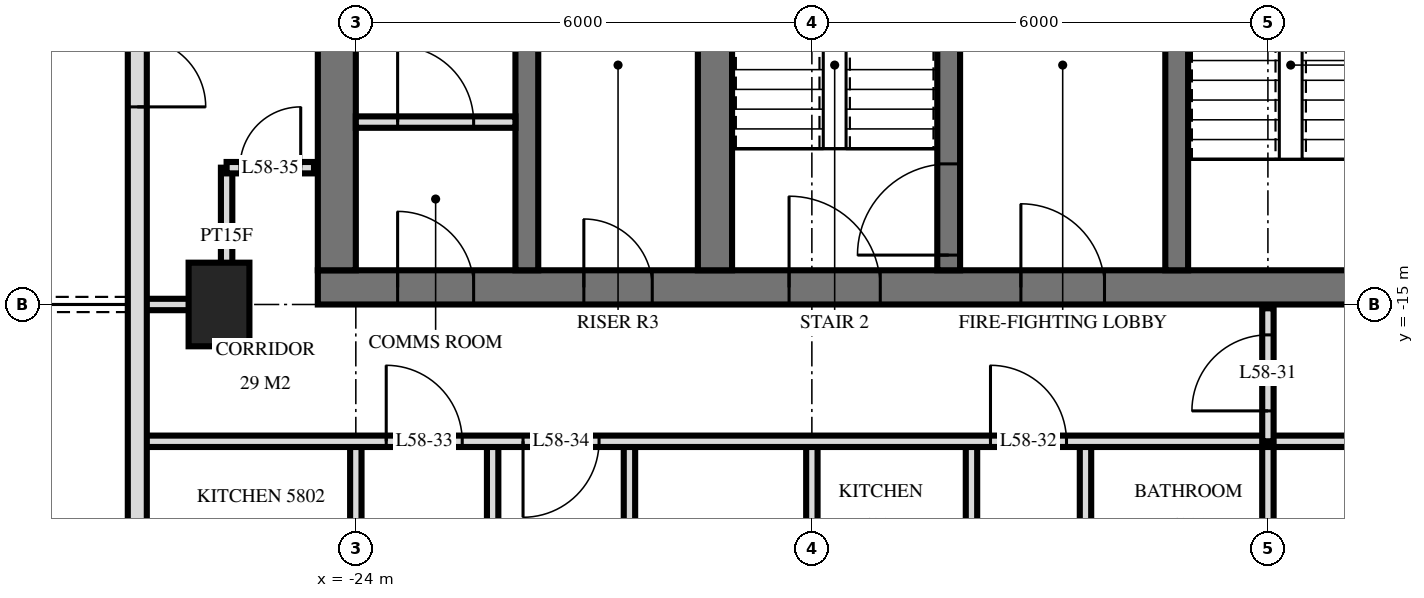
"""IFC4 building model, lengths in metres.
Left out: names, types, materials, properties, quantities, classifications, styles, units other than length and angle.
Written with IfcOpenShell. Run it as: python <this file> out.ifc"""

import sys

from ifc_helpers import new_model, si_unit, direction, frame, frame_2d, origin, origin_2d, place, context, subcontext, project, spatial, rectangle, extrude, element, fill, save


model = new_model("IFC4")
c1 = context("Model", 3, precision=1e-05, world=origin(), true_north=direction((0.0, 1.0)))
c2 = subcontext(c1, "Body", "Model", "MODEL_VIEW")
j1 = project(units=[si_unit("LENGTHUNIT", "METRE"), si_unit("PLANEANGLEUNIT", "RADIAN")], contexts=[c1])
p1 = place(None, origin())
s1 = spatial("IfcSite", under=j1, at=p1, CompositionType="ELEMENT")
p2 = place(p1, origin())
s2 = spatial("IfcBuilding", under=s1, at=p2, CompositionType="ELEMENT")
p3 = place(p2, frame((0.0, 0.0, 222.1)))
s3 = spatial("IfcBuildingStorey", under=s2, at=p3, CompositionType="ELEMENT", Elevation=222.1)
p4 = place(p3, frame((-25.8, -15.0, 0.0), z_axis=(0.0, 0.0, 1.0), x_axis=(0.0, 1.0, 0.0)))
e1 = element("IfcColumn", 1, at=p4, inside=s3, PredefinedType="COLUMN", context=c2, shape_type="SweptSolid", body=[
    extrude(rectangle(XDim=1.1, YDim=0.8, at=origin_2d()), origin(), (0.0, 0.0, 1.0), 3.5),
])
p5 = place(p3, frame((-24.5, -14.775, 0.0), z_axis=(0.0, 0.0, 1.0), x_axis=(1.0, 0.0, 0.0)))
e2 = element("IfcWall", 2, at=p5, inside=s3, PredefinedType="SHEAR", context=c2, shape_type="SweptSolid", body=[
    extrude(rectangle(XDim=14.5, YDim=0.45, at=frame_2d((7.25, 0.0))), origin(), (0.0, 0.0, 1.0), 3.5),
])
p6 = place(p5, frame((6.2, 0.0, 0.0)))
e3 = element("IfcOpeningElement", 3, at=p6, cuts=e2, PredefinedType="OPENING", context=c2, shape_type="SweptSolid", body=[
    extrude(rectangle(XDim=1.2, YDim=2.1, at=frame_2d((0.6, 1.05))), frame((0.0, 0.235, 0.0), z_axis=(0.0, -1.0, 0.0), x_axis=(1.0, 0.0, 0.0)), (0.0, 0.0, 1.0), 0.47),
])
p7 = place(p5, frame((9.25, 0.0, 0.0)))
e4 = element("IfcOpeningElement", 4, at=p7, cuts=e2, PredefinedType="OPENING", context=c2, shape_type="SweptSolid", body=[
    extrude(rectangle(XDim=1.1, YDim=2.1, at=frame_2d((0.55, 1.05))), frame((0.0, 0.235, 0.0), z_axis=(0.0, -1.0, 0.0), x_axis=(1.0, 0.0, 0.0)), (0.0, 0.0, 1.0), 0.47),
])
p8 = place(p5, frame((3.5, 0.0, 0.0)))
e5 = element("IfcOpeningElement", 5, at=p8, cuts=e2, PredefinedType="OPENING", context=c2, shape_type="SweptSolid", body=[
    extrude(rectangle(XDim=0.9, YDim=2.1, at=frame_2d((0.45, 1.05))), frame((0.0, 0.235, 0.0), z_axis=(0.0, -1.0, 0.0), x_axis=(1.0, 0.0, 0.0)), (0.0, 0.0, 1.0), 0.47),
])
p9 = place(p5, frame((1.05, 0.0, 0.0)))
e6 = element("IfcOpeningElement", 6, at=p9, cuts=e2, PredefinedType="OPENING", context=c2, shape_type="SweptSolid", body=[
    extrude(rectangle(XDim=1.0, YDim=2.1, at=frame_2d((0.5, 1.05))), frame((0.0, 0.235, 0.0), z_axis=(0.0, -1.0, 0.0), x_axis=(1.0, 0.0, 0.0)), (0.0, 0.0, 1.0), 0.47),
])
p10 = place(p3, frame((-24.25, -14.55, 0.0), z_axis=(0.0, 0.0, 1.0), x_axis=(0.0, 1.0, 0.0)))
e7 = element("IfcWall", 7, at=p10, inside=s3, PredefinedType="SHEAR", context=c2, shape_type="SweptSolid", body=[
    extrude(rectangle(XDim=14.1, YDim=0.5, at=frame_2d((7.05, 0.0))), origin(), (0.0, 0.0, 1.0), 3.5),
])
p11 = place(p3, frame((-13.2, -14.55, 0.0), z_axis=(0.0, 0.0, 1.0), x_axis=(0.0, 1.0, 0.0)))
e8 = element("IfcWall", 8, at=p11, inside=s3, PredefinedType="SHEAR", context=c2, shape_type="SweptSolid", body=[
    extrude(rectangle(XDim=5.4, YDim=0.3, at=frame_2d((2.7, 0.0))), origin(), (0.0, 0.0, 1.0), 3.5),
])
p12 = place(p11, frame((4.0, 0.0, 0.0)))
e9 = element("IfcOpeningElement", 9, at=p12, cuts=e8, PredefinedType="OPENING", context=c2, shape_type="SweptSolid", body=[
    extrude(rectangle(XDim=1.2, YDim=2.1, at=frame_2d((0.6, 1.05))), frame((0.0, 0.16, 0.0), z_axis=(0.0, -1.0, 0.0), x_axis=(1.0, 0.0, 0.0)), (0.0, 0.0, 1.0), 0.32),
])
p13 = place(p3, frame((-16.2, -14.55, 0.0), z_axis=(0.0, 0.0, 1.0), x_axis=(0.0, 1.0, 0.0)))
e10 = element("IfcWall", 10, at=p13, inside=s3, PredefinedType="SHEAR", context=c2, shape_type="SweptSolid", body=[
    extrude(rectangle(XDim=5.4, YDim=0.3, at=frame_2d((2.7, 0.0))), origin(), (0.0, 0.0, 1.0), 3.5),
])
p14 = place(p13, frame((0.2, 0.0, 0.0)))
e11 = element("IfcOpeningElement", 11, at=p14, cuts=e10, PredefinedType="OPENING", context=c2, shape_type="SweptSolid", body=[
    extrude(rectangle(XDim=1.2, YDim=2.1, at=frame_2d((0.6, 1.05))), frame((0.0, 0.16, 0.0), z_axis=(0.0, -1.0, 0.0), x_axis=(1.0, 0.0, 0.0)), (0.0, 0.0, 1.0), 0.32),
])
p15 = place(p3, frame((-19.275, -14.55, 0.0), z_axis=(0.0, 0.0, 1.0), x_axis=(0.0, 1.0, 0.0)))
e12 = element("IfcWall", 12, at=p15, inside=s3, PredefinedType="SHEAR", context=c2, shape_type="SweptSolid", body=[
    extrude(rectangle(XDim=5.4, YDim=0.45, at=frame_2d((2.7, 0.0))), origin(), (0.0, 0.0, 1.0), 3.5),
])
p16 = place(p3, frame((-21.75, -14.55, 0.0), z_axis=(0.0, 0.0, 1.0), x_axis=(0.0, 1.0, 0.0)))
e13 = element("IfcWall", 13, at=p16, inside=s3, PredefinedType="SHEAR", context=c2, shape_type="SweptSolid", body=[
    extrude(rectangle(XDim=5.4, YDim=0.3, at=frame_2d((2.7, 0.0))), origin(), (0.0, 0.0, 1.0), 3.5),
])
p17 = place(p3, frame((-26.875, -3.325, 0.0), z_axis=(0.0, 0.0, 1.0), x_axis=(0.0, -1.0, 0.0)))
e14 = element("IfcWall", 14, at=p17, inside=s3, PredefinedType="SOLIDWALL", context=c2, shape_type="SweptSolid", body=[
    extrude(rectangle(XDim=21.551, YDim=0.25, at=frame_2d((10.775, 0.0))), origin(), (0.0, 0.0, 1.0), 3.22),
])
p18 = place(p17, frame((7.275, 0.0, 0.0)))
e15 = element("IfcOpeningElement", 15, at=p18, cuts=e14, PredefinedType="OPENING", context=c2, shape_type="SweptSolid", body=[
    extrude(rectangle(XDim=1.8, YDim=2.4, at=frame_2d((0.9, 1.2))), frame((0.0, 0.135, 0.0), z_axis=(0.0, -1.0, 0.0), x_axis=(1.0, 0.0, 0.0)), (0.0, 0.0, 1.0), 0.27),
])
p19 = place(p17, frame((15.275, 0.0, 0.0)))
e16 = element("IfcOpeningElement", 16, at=p19, cuts=e14, PredefinedType="OPENING", context=c2, shape_type="SweptSolid", body=[
    extrude(rectangle(XDim=1.8, YDim=2.4, at=frame_2d((0.9, 1.2))), frame((0.0, 0.135, 0.0), z_axis=(0.0, -1.0, 0.0), x_axis=(1.0, 0.0, 0.0)), (0.0, 0.0, 1.0), 0.27),
])
p20 = place(p17, frame((18.875, 0.0, 0.0)))
e17 = element("IfcOpeningElement", 17, at=p20, cuts=e14, PredefinedType="OPENING", context=c2, shape_type="SweptSolid", body=[
    extrude(rectangle(XDim=1.8, YDim=2.4, at=frame_2d((0.9, 1.2))), frame((0.0, 0.135, 0.0), z_axis=(0.0, -1.0, 0.0), x_axis=(1.0, 0.0, 0.0)), (0.0, 0.0, 1.0), 0.27),
])
p21 = place(p3, frame((-24.0, -12.6, 0.0), z_axis=(0.0, 0.0, 1.0), x_axis=(1.0, 0.0, 0.0)))
e18 = element("IfcWall", 18, at=p21, inside=s3, PredefinedType="PARTITIONING", context=c2, shape_type="SweptSolid", body=[
    extrude(rectangle(XDim=2.1, YDim=0.15, at=frame_2d((1.05, 0.0))), origin(), (0.0, 0.0, 1.0), 3.2),
])
p22 = place(p21, frame((0.55, 0.0, 0.0)))
e19 = element("IfcOpeningElement", 19, at=p22, cuts=e18, PredefinedType="OPENING", context=c2, shape_type="SweptSolid", body=[
    extrude(rectangle(XDim=1.0, YDim=2.1, at=frame_2d((0.5, 1.05))), frame((0.0, 0.085, 0.0), z_axis=(0.0, -1.0, 0.0), x_axis=(1.0, 0.0, 0.0)), (0.0, 0.0, 1.0), 0.17),
])
p23 = place(p3, frame((-12.0, -16.8, 0.0), z_axis=(0.0, 0.0, 1.0), x_axis=(0.0, 1.0, 0.0)))
e20 = element("IfcWall", 20, at=p23, inside=s3, PredefinedType="PARTITIONING", context=c2, shape_type="SweptSolid", body=[
    extrude(rectangle(XDim=1.75, YDim=0.15, at=frame_2d((0.875, 0.0))), origin(), (0.0, 0.0, 1.0), 3.22),
])
p24 = place(p23, frame((0.4, 0.0, 0.0)))
e21 = element("IfcOpeningElement", 21, at=p24, cuts=e20, PredefinedType="OPENING", context=c2, shape_type="SweptSolid", body=[
    extrude(rectangle(XDim=1.0, YDim=2.1, at=frame_2d((0.5, 1.05))), frame((0.0, 0.085, 0.0), z_axis=(0.0, -1.0, 0.0), x_axis=(1.0, 0.0, 0.0)), (0.0, 0.0, 1.0), 0.17),
])
p25 = place(p3, frame((-12.0, -29.22, 0.0), z_axis=(0.0, 0.0, 1.0), x_axis=(0.0, 1.0, 0.0)))
e22 = element("IfcWall", 22, at=p25, inside=s3, PredefinedType="PARTITIONING", context=c2, shape_type="SweptSolid", body=[
    extrude(rectangle(XDim=12.42, YDim=0.15, at=frame_2d((6.21, 0.0))), origin(), (0.0, 0.0, 1.0), 3.22),
])
p26 = place(p3, frame((-14.4, -21.0, 0.0), z_axis=(0.0, 0.0, 1.0), x_axis=(0.0, 1.0, 0.0)))
e23 = element("IfcWall", 23, at=p26, inside=s3, PredefinedType="PARTITIONING", context=c2, shape_type="SweptSolid", body=[
    extrude(rectangle(XDim=4.2, YDim=0.15, at=frame_2d((2.1, 0.0))), origin(), (0.0, 0.0, 1.0), 3.22),
])
p27 = place(p26, frame((1.6, 0.0, 0.0)))
e24 = element("IfcOpeningElement", 24, at=p27, cuts=e23, PredefinedType="OPENING", context=c2, shape_type="SweptSolid", body=[
    extrude(rectangle(XDim=1.0, YDim=2.1, at=frame_2d((0.5, 1.05))), frame((0.0, 0.085, 0.0), z_axis=(0.0, -1.0, 0.0), x_axis=(1.0, 0.0, 0.0)), (0.0, 0.0, 1.0), 0.17),
])
p28 = place(p3, frame((-15.9, -21.0, 0.0), z_axis=(0.0, 0.0, 1.0), x_axis=(0.0, 1.0, 0.0)))
e25 = element("IfcWall", 25, at=p28, inside=s3, PredefinedType="PARTITIONING", context=c2, shape_type="SweptSolid", body=[
    extrude(rectangle(XDim=4.2, YDim=0.15, at=frame_2d((2.1, 0.0))), origin(), (0.0, 0.0, 1.0), 3.22),
])
p29 = place(p28, frame((1.6, 0.0, 0.0)))
e26 = element("IfcOpeningElement", 26, at=p29, cuts=e25, PredefinedType="OPENING", context=c2, shape_type="SweptSolid", body=[
    extrude(rectangle(XDim=1.0, YDim=2.1, at=frame_2d((0.5, 1.05))), frame((0.0, 0.085, 0.0), z_axis=(0.0, -1.0, 0.0), x_axis=(1.0, 0.0, 0.0)), (0.0, 0.0, 1.0), 0.17),
])
p30 = place(p3, frame((-18.0, -29.22, 0.0), z_axis=(0.0, 0.0, 1.0), x_axis=(0.0, 1.0, 0.0)))
e27 = element("IfcWall", 27, at=p30, inside=s3, PredefinedType="PARTITIONING", context=c2, shape_type="SweptSolid", body=[
    extrude(rectangle(XDim=12.42, YDim=0.15, at=frame_2d((6.21, 0.0))), origin(), (0.0, 0.0, 1.0), 3.22),
])
for number, where, z_axis, x_axis in (
    (28, (-20.4, -21.0, 0.0), (0.0, 0.0, 1.0), (0.0, 1.0, 0.0)),
    (29, (-22.2, -21.0, 0.0), (0.0, 0.0, 1.0), (0.0, 1.0, 0.0)),
):
    element("IfcWall", number, at=place(p3, frame(where, z_axis=z_axis, x_axis=x_axis)), inside=s3, PredefinedType="PARTITIONING", context=c2, shape_type="SweptSolid", body=[
        extrude(rectangle(XDim=4.2, YDim=0.15, at=frame_2d((2.1, 0.0))), origin(), (0.0, 0.0, 1.0), 3.22),
    ])
p31 = place(p3, frame((-24.0, -21.0, 0.0), z_axis=(0.0, 0.0, 1.0), x_axis=(0.0, 1.0, 0.0)))
e30 = element("IfcWall", 30, at=p31, inside=s3, PredefinedType="PARTITIONING", context=c2, shape_type="SweptSolid", body=[
    extrude(rectangle(XDim=4.2, YDim=0.15, at=frame_2d((2.1, 0.0))), origin(), (0.0, 0.0, 1.0), 3.22),
])
p32 = place(p31, frame((1.58, 0.0, 0.0)))
e31 = element("IfcOpeningElement", 31, at=p32, cuts=e30, PredefinedType="OPENING", context=c2, shape_type="SweptSolid", body=[
    extrude(rectangle(XDim=1.0, YDim=2.1, at=frame_2d((0.5, 1.05))), frame((0.0, 0.085, 0.0), z_axis=(0.0, -1.0, 0.0), x_axis=(1.0, 0.0, 0.0)), (0.0, 0.0, 1.0), 0.17),
])
p33 = place(p3, frame((-25.7, -15.0, 0.0), z_axis=(0.0, 0.0, 1.0), x_axis=(0.0, 1.0, 0.0)))
e32 = element("IfcWall", 32, at=p33, inside=s3, PredefinedType="PARTITIONING", context=c2, shape_type="SweptSolid", body=[
    extrude(rectangle(XDim=1.8, YDim=0.15, at=frame_2d((0.9, 0.0))), origin(), (0.0, 0.0, 1.0), 3.22),
])
p34 = place(p3, frame((-26.82, -16.8, 0.0), z_axis=(0.0, 0.0, 1.0), x_axis=(1.0, 0.0, 0.0)))
e33 = element("IfcWall", 33, at=p34, inside=s3, PredefinedType="PARTITIONING", context=c2, shape_type="SweptSolid", body=[
    extrude(rectangle(XDim=53.64, YDim=0.15, at=frame_2d((26.82, 0.0))), origin(), (0.0, 0.0, 1.0), 3.22),
])
p35 = place(p34, frame((11.17, 0.0, 0.0)))
e34 = element("IfcOpeningElement", 34, at=p35, cuts=e33, PredefinedType="OPENING", context=c2, shape_type="SweptSolid", body=[
    extrude(rectangle(XDim=1.0, YDim=2.1, at=frame_2d((0.5, 1.05))), frame((0.0, 0.085, 0.0), z_axis=(0.0, -1.0, 0.0), x_axis=(1.0, 0.0, 0.0)), (0.0, 0.0, 1.0), 0.17),
])
p36 = place(p34, frame((3.22, 0.0, 0.0)))
e35 = element("IfcOpeningElement", 35, at=p36, cuts=e33, PredefinedType="OPENING", context=c2, shape_type="SweptSolid", body=[
    extrude(rectangle(XDim=1.0, YDim=2.1, at=frame_2d((0.5, 1.05))), frame((0.0, 0.085, 0.0), z_axis=(0.0, -1.0, 0.0), x_axis=(1.0, 0.0, 0.0)), (0.0, 0.0, 1.0), 0.17),
])
p37 = place(p34, frame((5.02, 0.0, 0.0)))
e36 = element("IfcOpeningElement", 36, at=p37, cuts=e33, PredefinedType="OPENING", context=c2, shape_type="SweptSolid", body=[
    extrude(rectangle(XDim=1.0, YDim=2.1, at=frame_2d((0.5, 1.05))), frame((0.0, 0.085, 0.0), z_axis=(0.0, -1.0, 0.0), x_axis=(1.0, 0.0, 0.0)), (0.0, 0.0, 1.0), 0.17),
])
p38 = place(p34, frame((47.72, 0.0, 0.0)))
e37 = element("IfcOpeningElement", 37, at=p38, cuts=e33, PredefinedType="OPENING", context=c2, shape_type="SweptSolid", body=[
    extrude(rectangle(XDim=1.0, YDim=2.1, at=frame_2d((0.5, 1.05))), frame((0.0, 0.085, 0.0), z_axis=(0.0, -1.0, 0.0), x_axis=(1.0, 0.0, 0.0)), (0.0, 0.0, 1.0), 0.17),
])
p39 = place(p34, frame((51.04, 0.0, 0.0)))
e38 = element("IfcOpeningElement", 38, at=p39, cuts=e33, PredefinedType="OPENING", context=c2, shape_type="SweptSolid", body=[
    extrude(rectangle(XDim=1.0, YDim=2.1, at=frame_2d((0.5, 1.05))), frame((0.0, 0.085, 0.0), z_axis=(0.0, -1.0, 0.0), x_axis=(1.0, 0.0, 0.0)), (0.0, 0.0, 1.0), 0.17),
])
p40 = place(p34, frame((17.32, 0.0, 0.0)))
e39 = element("IfcOpeningElement", 39, at=p40, cuts=e33, PredefinedType="OPENING", context=c2, shape_type="SweptSolid", body=[
    extrude(rectangle(XDim=1.0, YDim=2.1, at=frame_2d((0.5, 1.05))), frame((0.0, 0.085, 0.0), z_axis=(0.0, -1.0, 0.0), x_axis=(1.0, 0.0, 0.0)), (0.0, 0.0, 1.0), 0.17),
])
p41 = place(p34, frame((26.32, 0.0, 0.0)))
e40 = element("IfcOpeningElement", 40, at=p41, cuts=e33, PredefinedType="OPENING", context=c2, shape_type="SweptSolid", body=[
    extrude(rectangle(XDim=1.0, YDim=2.1, at=frame_2d((0.5, 1.05))), frame((0.0, 0.085, 0.0), z_axis=(0.0, -1.0, 0.0), x_axis=(1.0, 0.0, 0.0)), (0.0, 0.0, 1.0), 0.17),
])
p42 = place(p34, frame((35.32, 0.0, 0.0)))
e41 = element("IfcOpeningElement", 41, at=p42, cuts=e33, PredefinedType="OPENING", context=c2, shape_type="SweptSolid", body=[
    extrude(rectangle(XDim=1.0, YDim=2.1, at=frame_2d((0.5, 1.05))), frame((0.0, 0.085, 0.0), z_axis=(0.0, -1.0, 0.0), x_axis=(1.0, 0.0, 0.0)), (0.0, 0.0, 1.0), 0.17),
])
p43 = place(p3, frame((-26.82, -15.0, 0.0), z_axis=(0.0, 0.0, 1.0), x_axis=(1.0, 0.0, 0.0)))
e42 = element("IfcWall", 42, at=p43, inside=s3, PredefinedType="PARTITIONING", context=c2, shape_type="SweptSolid", body=[
    extrude(rectangle(XDim=1.12, YDim=0.15, at=frame_2d((0.56, 0.0))), origin(), (0.0, 0.0, 1.0), 3.22),
])
p44 = place(p3, frame((-25.7, -13.2, 0.0), z_axis=(0.0, 0.0, 1.0), x_axis=(1.0, 0.0, 0.0)))
e43 = element("IfcWall", 43, at=p44, inside=s3, PredefinedType="PARTITIONING", context=c2, shape_type="SweptSolid", body=[
    extrude(rectangle(XDim=1.15, YDim=0.15, at=frame_2d((0.575, 0.0))), origin(), (0.0, 0.0, 1.0), 3.22),
])
p45 = place(p44, frame((0.175, 0.0, 0.0)))
e44 = element("IfcOpeningElement", 44, at=p45, cuts=e43, PredefinedType="OPENING", context=c2, shape_type="SweptSolid", body=[
    extrude(rectangle(XDim=0.8, YDim=2.1, at=frame_2d((0.4, 1.05))), frame((0.0, 0.085, 0.0), z_axis=(0.0, -1.0, 0.0), x_axis=(1.0, 0.0, 0.0)), (0.0, 0.0, 1.0), 0.17),
])
p46 = place(p18, origin())
e45 = element("IfcDoor", 45, at=p46, inside=s3, OperationType="DOUBLE_DOOR_SINGLE_SWING", PredefinedType="DOOR", context=c2, shape_type="SweptSolid", body=[
    extrude(rectangle(XDim=1.8, YDim=2.4, at=frame_2d((0.9, 1.2))), frame((0.0, 0.025, 0.0), z_axis=(0.0, -1.0, 0.0), x_axis=(1.0, 0.0, 0.0)), (0.0, 0.0, 1.0), 0.05),
])
fill(e15, e45)
p47 = place(p6, origin())
e46 = element("IfcDoor", 46, at=p47, inside=s3, OperationType="SINGLE_SWING_RIGHT", PredefinedType="DOOR", context=c2, shape_type="SweptSolid", body=[
    extrude(rectangle(XDim=1.2, YDim=2.1, at=frame_2d((0.6, 1.05))), frame((0.0, 0.025, 0.0), z_axis=(0.0, -1.0, 0.0), x_axis=(1.0, 0.0, 0.0)), (0.0, 0.0, 1.0), 0.05),
])
fill(e3, e46)
p48 = place(p7, origin())
e47 = element("IfcDoor", 47, at=p48, inside=s3, OperationType="SINGLE_SWING_RIGHT", PredefinedType="DOOR", context=c2, shape_type="SweptSolid", body=[
    extrude(rectangle(XDim=1.1, YDim=2.1, at=frame_2d((0.55, 1.05))), frame((0.0, 0.025, 0.0), z_axis=(0.0, -1.0, 0.0), x_axis=(1.0, 0.0, 0.0)), (0.0, 0.0, 1.0), 0.05),
])
fill(e4, e47)
p49 = place(p8, origin())
e48 = element("IfcDoor", 48, at=p49, inside=s3, OperationType="SINGLE_SWING_RIGHT", PredefinedType="DOOR", context=c2, shape_type="SweptSolid", body=[
    extrude(rectangle(XDim=0.9, YDim=2.1, at=frame_2d((0.45, 1.05))), frame((0.0, 0.025, 0.0), z_axis=(0.0, -1.0, 0.0), x_axis=(1.0, 0.0, 0.0)), (0.0, 0.0, 1.0), 0.05),
])
fill(e5, e48)
p50 = place(p9, origin())
e49 = element("IfcDoor", 49, at=p50, inside=s3, OperationType="SINGLE_SWING_RIGHT", PredefinedType="DOOR", context=c2, shape_type="SweptSolid", body=[
    extrude(rectangle(XDim=1.0, YDim=2.1, at=frame_2d((0.5, 1.05))), frame((0.0, 0.025, 0.0), z_axis=(0.0, -1.0, 0.0), x_axis=(1.0, 0.0, 0.0)), (0.0, 0.0, 1.0), 0.05),
])
fill(e6, e49)
p51 = place(p14, origin())
e50 = element("IfcDoor", 50, at=p51, inside=s3, OperationType="SINGLE_SWING_RIGHT", PredefinedType="DOOR", context=c2, shape_type="SweptSolid", body=[
    extrude(rectangle(XDim=1.2, YDim=2.1, at=frame_2d((0.6, 1.05))), frame((0.0, 0.025, 0.0), z_axis=(0.0, -1.0, 0.0), x_axis=(1.0, 0.0, 0.0)), (0.0, 0.0, 1.0), 0.05),
])
fill(e11, e50)
p52 = place(p22, origin())
e51 = element("IfcDoor", 51, at=p52, inside=s3, OperationType="SINGLE_SWING_RIGHT", PredefinedType="DOOR", context=c2, shape_type="SweptSolid", body=[
    extrude(rectangle(XDim=1.0, YDim=2.1, at=frame_2d((0.5, 1.05))), frame((0.0, 0.025, 0.0), z_axis=(0.0, -1.0, 0.0), x_axis=(1.0, 0.0, 0.0)), (0.0, 0.0, 1.0), 0.05),
])
fill(e19, e51)
p53 = place(p24, origin())
e52 = element("IfcDoor", 52, at=p53, inside=s3, OperationType="SINGLE_SWING_RIGHT", PredefinedType="DOOR", context=c2, shape_type="SweptSolid", body=[
    extrude(rectangle(XDim=1.0, YDim=2.1, at=frame_2d((0.5, 1.05))), frame((0.0, 0.025, 0.0), z_axis=(0.0, -1.0, 0.0), x_axis=(1.0, 0.0, 0.0)), (0.0, 0.0, 1.0), 0.05),
])
fill(e21, e52)
p54 = place(p35, origin())
e53 = element("IfcDoor", 53, at=p54, inside=s3, OperationType="SINGLE_SWING_RIGHT", PredefinedType="DOOR", context=c2, shape_type="SweptSolid", body=[
    extrude(rectangle(XDim=1.0, YDim=2.1, at=frame_2d((0.5, 1.05))), frame((0.0, 0.025, 0.0), z_axis=(0.0, -1.0, 0.0), x_axis=(1.0, 0.0, 0.0)), (0.0, 0.0, 1.0), 0.05),
])
fill(e34, e53)
p55 = place(p36, origin())
e54 = element("IfcDoor", 54, at=p55, inside=s3, OperationType="SINGLE_SWING_RIGHT", PredefinedType="DOOR", context=c2, shape_type="SweptSolid", body=[
    extrude(rectangle(XDim=1.0, YDim=2.1, at=frame_2d((0.5, 1.05))), frame((0.0, 0.025, 0.0), z_axis=(0.0, -1.0, 0.0), x_axis=(1.0, 0.0, 0.0)), (0.0, 0.0, 1.0), 0.05),
])
fill(e35, e54)
p56 = place(p37, frame((0.5, 0.0, 0.0), z_axis=(0.0, 0.0, 1.0), x_axis=(-1.0, 0.0, 0.0)))
e55 = element("IfcDoor", 55, at=p56, inside=s3, OperationType="SINGLE_SWING_LEFT", PredefinedType="DOOR", context=c2, shape_type="SweptSolid", body=[
    extrude(rectangle(XDim=1.0, YDim=2.1, at=frame_2d((0.0, 1.05))), frame((0.0, -0.025, 0.0), z_axis=(0.0, 1.0, 0.0), x_axis=(-1.0, 0.0, 0.0)), (0.0, 0.0, 1.0), 0.05),
])
fill(e36, e55)
p57 = place(p45, origin())
e56 = element("IfcDoor", 56, at=p57, inside=s3, OperationType="SINGLE_SWING_LEFT", PredefinedType="DOOR", context=c2, shape_type="SweptSolid", body=[
    extrude(rectangle(XDim=0.8, YDim=2.1, at=frame_2d((0.4, 1.05))), frame((0.0, 0.025, 0.0), z_axis=(0.0, -1.0, 0.0), x_axis=(1.0, 0.0, 0.0)), (0.0, 0.0, 1.0), 0.05),
])
fill(e44, e56)
save(model, sys.argv[1])
